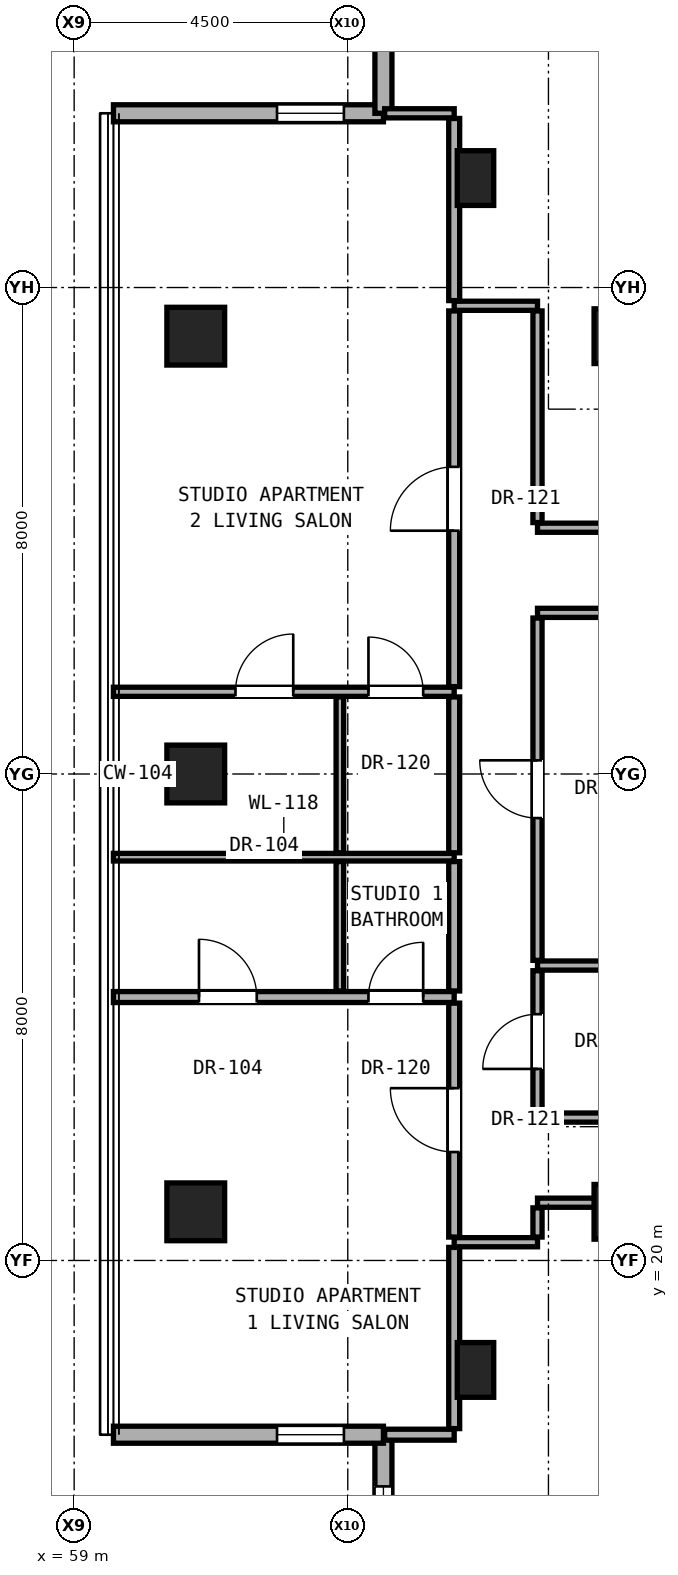
"""IFC4 building model, lengths in metres.
Left out: names, types, materials, properties, quantities, classifications, styles, units other than length and angle.
Written with IfcOpenShell. Run it as: python <this file> out.ifc"""

import sys

from ifc_helpers import new_model, si_unit, direction, frame, frame_2d, origin, origin_2d, place, context, subcontext, project, spatial, rectangle, hollow_rectangle, extrude, element, fill, save


model = new_model("IFC4")
c1 = context("Model", 3, precision=1e-05, world=origin(), true_north=direction((0.0, 1.0)))
c2 = subcontext(c1, "Body", "Model", "MODEL_VIEW")
j1 = project(units=[si_unit("LENGTHUNIT", "METRE"), si_unit("PLANEANGLEUNIT", "RADIAN")], contexts=[c1])
p1 = place(None, origin())
s1 = spatial("IfcSite", under=j1, at=p1, CompositionType="ELEMENT")
p2 = place(p1, origin())
s2 = spatial("IfcBuilding", under=s1, at=p2, CompositionType="ELEMENT")
p3 = place(p2, frame((0.0, 0.0, 190.15)))
s3 = spatial("IfcBuildingStorey", under=s2, at=p3, CompositionType="ELEMENT", Elevation=190.15)
for number, where, z_axis, x_axis in (
    (1, (68.0, 20.8, 0.0), (0.0, 0.0, 1.0), (1.0, 0.0, 0.0)),
    (2, (68.0, 35.2, 0.0), (0.0, 0.0, 1.0), (1.0, 0.0, 0.0)),
):
    element("IfcColumn", number, at=place(p3, frame(where, z_axis=z_axis, x_axis=x_axis)), inside=s3, PredefinedType="COLUMN", context=c2, shape_type="SweptSolid", body=[
        extrude(rectangle(XDim=0.9, YDim=0.9, at=origin_2d()), origin(), (0.0, 0.0, 1.0), 3.25),
    ])
for number, where, z_axis, x_axis in (
    (3, (61.0, 20.8, 0.0), (0.0, 0.0, 1.0), (1.0, 0.0, 0.0)),
    (4, (61.0, 28.0, 0.0), (0.0, 0.0, 1.0), (1.0, 0.0, 0.0)),
    (5, (61.0, 35.2, 0.0), (0.0, 0.0, 1.0), (1.0, 0.0, 0.0)),
):
    element("IfcColumn", number, at=place(p3, frame(where, z_axis=z_axis, x_axis=x_axis)), inside=s3, PredefinedType="COLUMN", context=c2, shape_type="SweptSolid", body=[
        extrude(hollow_rectangle(XDim=0.95, YDim=0.95, WallThickness=0.05, at=origin_2d()), origin(), (0.0, 0.0, 1.0), 3.25),
    ])
for number, where, z_axis, x_axis in (
    (6, (65.6, 18.2, 0.0), (0.0, 0.0, 1.0), (1.0, 0.0, 0.0)),
    (7, (65.6, 37.8, 0.0), (0.0, 0.0, 1.0), (1.0, 0.0, 0.0)),
):
    element("IfcColumn", number, at=place(p3, frame(where, z_axis=z_axis, x_axis=x_axis)), inside=s3, PredefinedType="PILASTER", context=c2, shape_type="SweptSolid", body=[
        extrude(rectangle(XDim=0.6, YDim=0.9, at=origin_2d()), origin(), (0.0, 0.0, 1.0), 3.25),
    ])
p4 = place(p3, frame((64.086, 17.135, 0.0), z_axis=(0.0, 0.0, 1.0), x_axis=(0.0, -1.0, 0.0)))
e8 = element("IfcWall", 8, at=p4, inside=s3, PredefinedType="SOLIDWALL", context=c2, shape_type="SweptSolid", body=[
    extrude(rectangle(XDim=4.44, YDim=0.28, at=frame_2d((2.22, 0.0))), origin(), (0.0, 0.0, 1.0), 3.03),
])
p5 = place(p4, frame((0.85, 0.0, 0.68)))
e9 = element("IfcOpeningElement", 9, at=p5, cuts=e8, PredefinedType="OPENING", context=c2, shape_type="SweptSolid", body=[
    extrude(rectangle(XDim=1.35, YDim=2.2, at=frame_2d((0.675, 1.1))), frame((0.0, 0.15, 0.0), z_axis=(0.0, -1.0, 0.0), x_axis=(1.0, 0.0, 0.0)), (0.0, 0.0, 1.0), 0.3),
])
p6 = place(p3, frame((59.646, 17.135, 0.0), z_axis=(0.0, 0.0, 1.0), x_axis=(1.0, 0.0, 0.0)))
e10 = element("IfcWall", 10, at=p6, inside=s3, PredefinedType="SOLIDWALL", context=c2, shape_type="SweptSolid", body=[
    extrude(rectangle(XDim=4.44, YDim=0.28, at=frame_2d((2.22, 0.0))), origin(), (0.0, 0.0, 1.0), 3.03),
])
p7 = place(p6, frame((2.69, 0.0, 0.85)))
e11 = element("IfcOpeningElement", 11, at=p7, cuts=e10, PredefinedType="OPENING", context=c2, shape_type="SweptSolid", body=[
    extrude(rectangle(XDim=1.1, YDim=2.0, at=frame_2d((0.55, 1.0))), frame((0.0, 0.15, 0.0), z_axis=(0.0, -1.0, 0.0), x_axis=(1.0, 0.0, 0.0)), (0.0, 0.0, 1.0), 0.3),
])
p8 = place(p3, frame((64.086, 38.865, 0.0), z_axis=(0.0, 0.0, 1.0), x_axis=(-1.0, 0.0, 0.0)))
e12 = element("IfcWall", 12, at=p8, inside=s3, PredefinedType="SOLIDWALL", context=c2, shape_type="SweptSolid", body=[
    extrude(rectangle(XDim=4.44, YDim=0.28, at=frame_2d((2.22, 0.0))), origin(), (0.0, 0.0, 1.0), 3.03),
])
p9 = place(p8, frame((0.65, 0.0, 0.85)))
e13 = element("IfcOpeningElement", 13, at=p9, cuts=e12, PredefinedType="OPENING", context=c2, shape_type="SweptSolid", body=[
    extrude(rectangle(XDim=1.1, YDim=2.0, at=frame_2d((0.55, 1.0))), frame((0.0, 0.15, 0.0), z_axis=(0.0, -1.0, 0.0), x_axis=(1.0, 0.0, 0.0)), (0.0, 0.0, 1.0), 0.3),
])
p10 = place(p3, frame((64.086, 43.305, 0.0), z_axis=(0.0, 0.0, 1.0), x_axis=(0.0, -1.0, 0.0)))
e14 = element("IfcWall", 14, at=p10, inside=s3, PredefinedType="SOLIDWALL", context=c2, shape_type="SweptSolid", body=[
    extrude(rectangle(XDim=4.44, YDim=0.28, at=frame_2d((2.22, 0.0))), origin(), (0.0, 0.0, 1.0), 3.03),
])
p11 = place(p3, frame((64.106, 17.135, 0.0), z_axis=(0.0, 0.0, 1.0), x_axis=(1.0, 0.0, 0.0)))
e15 = element("IfcWall", 15, at=p11, inside=s3, PredefinedType="PARTITIONING", context=c2, shape_type="SweptSolid", body=[
    extrude(rectangle(XDim=1.144, YDim=0.18, at=frame_2d((0.572, 0.0))), origin(), (0.0, 0.0, 1.0), 3.05),
])
p12 = place(p3, frame((65.25, 20.3, 0.0), z_axis=(0.0, 0.0, 1.0), x_axis=(1.0, 0.0, 0.0)))
e16 = element("IfcWall", 16, at=p12, inside=s3, PredefinedType="PARTITIONING", context=c2, shape_type="SweptSolid", body=[
    extrude(rectangle(XDim=1.37, YDim=0.15, at=frame_2d((0.685, 0.0))), origin(), (0.0, 0.0, 1.0), 3.05),
])
p13 = place(p3, frame((66.62, 20.95, 0.0), z_axis=(0.0, 0.0, 1.0), x_axis=(1.0, 0.0, 0.0)))
e17 = element("IfcWall", 17, at=p13, inside=s3, PredefinedType="PARTITIONING", context=c2, shape_type="SweptSolid", body=[
    extrude(rectangle(XDim=1.11, YDim=0.15, at=frame_2d((0.555, 0.0))), origin(), (0.0, 0.0, 1.0), 2.442),
])
p14 = place(p3, frame((66.62, 22.35, 0.0), z_axis=(0.0, 0.0, 1.0), x_axis=(1.0, 0.0, 0.0)))
e18 = element("IfcWall", 18, at=p14, inside=s3, PredefinedType="PARTITIONING", context=c2, shape_type="SweptSolid", body=[
    extrude(rectangle(XDim=10.14, YDim=0.15, at=frame_2d((5.07, 0.0))), origin(), (0.0, 0.0, 1.0), 2.186),
])
p15 = place(p3, frame((59.646, 24.332, 0.0), z_axis=(0.0, 0.0, 1.0), x_axis=(1.0, 0.0, 0.0)))
e19 = element("IfcWall", 19, at=p15, inside=s3, PredefinedType="PARTITIONING", context=c2, shape_type="SweptSolid", body=[
    extrude(rectangle(XDim=5.604, YDim=0.18, at=frame_2d((2.802, 0.0))), origin(), (0.0, 0.0, 1.0), 2.269),
])
p16 = place(p15, frame((1.407, 0.0, 0.0)))
e20 = element("IfcOpeningElement", 20, at=p16, cuts=e19, PredefinedType="OPENING", context=c2, shape_type="SweptSolid", body=[
    extrude(rectangle(XDim=0.95, YDim=2.15, at=frame_2d((0.475, 1.075))), frame((0.0, 0.1, 0.0), z_axis=(0.0, -1.0, 0.0), x_axis=(1.0, 0.0, 0.0)), (0.0, 0.0, 1.0), 0.2),
])
p17 = place(p15, frame((4.194, 0.0, 0.0)))
e21 = element("IfcOpeningElement", 21, at=p17, cuts=e19, PredefinedType="OPENING", context=c2, shape_type="SweptSolid", body=[
    extrude(rectangle(XDim=0.9, YDim=2.1, at=frame_2d((0.45, 1.05))), frame((0.0, 0.1, 0.0), z_axis=(0.0, -1.0, 0.0), x_axis=(1.0, 0.0, 0.0)), (0.0, 0.0, 1.0), 0.2),
])
p18 = place(p3, frame((66.62, 24.85, 0.0), z_axis=(0.0, 0.0, 1.0), x_axis=(1.0, 0.0, 0.0)))
e22 = element("IfcWall", 22, at=p18, inside=s3, PredefinedType="PARTITIONING", context=c2, shape_type="SweptSolid", body=[
    extrude(rectangle(XDim=3.13, YDim=0.15, at=frame_2d((1.565, 0.0))), origin(), (0.0, 0.0, 1.0), 2.186),
])
p19 = place(p3, frame((59.646, 26.632, 0.0), z_axis=(0.0, 0.0, 1.0), x_axis=(1.0, 0.0, 0.0)))
e23 = element("IfcWall", 23, at=p19, inside=s3, PredefinedType="PARTITIONING", context=c2, shape_type="SweptSolid", body=[
    extrude(rectangle(XDim=5.604, YDim=0.125, at=frame_2d((2.802, 0.0))), origin(), (0.0, 0.0, 1.0), 2.269),
])
p20 = place(p3, frame((59.646, 29.352, 0.0), z_axis=(0.0, 0.0, 1.0), x_axis=(1.0, 0.0, 0.0)))
e24 = element("IfcWall", 24, at=p20, inside=s3, PredefinedType="PARTITIONING", context=c2, shape_type="SweptSolid", body=[
    extrude(rectangle(XDim=5.604, YDim=0.15, at=frame_2d((2.802, 0.0))), origin(), (0.0, 0.0, 1.0), 2.269),
])
p21 = place(p20, frame((2.007, 0.0, 0.0)))
e25 = element("IfcOpeningElement", 25, at=p21, cuts=e24, PredefinedType="OPENING", context=c2, shape_type="SweptSolid", body=[
    extrude(rectangle(XDim=0.95, YDim=2.15, at=frame_2d((0.475, 1.075))), frame((0.0, 0.085, 0.0), z_axis=(0.0, -1.0, 0.0), x_axis=(1.0, 0.0, 0.0)), (0.0, 0.0, 1.0), 0.17),
])
p22 = place(p20, frame((4.194, 0.0, 0.0)))
e26 = element("IfcOpeningElement", 26, at=p22, cuts=e24, PredefinedType="OPENING", context=c2, shape_type="SweptSolid", body=[
    extrude(rectangle(XDim=0.9, YDim=2.1, at=frame_2d((0.45, 1.05))), frame((0.0, 0.085, 0.0), z_axis=(0.0, -1.0, 0.0), x_axis=(1.0, 0.0, 0.0)), (0.0, 0.0, 1.0), 0.17),
])
p23 = place(p3, frame((66.62, 30.65, 0.0), z_axis=(0.0, 0.0, 1.0), x_axis=(1.0, 0.0, 0.0)))
e27 = element("IfcWall", 27, at=p23, inside=s3, PredefinedType="PARTITIONING", context=c2, shape_type="SweptSolid", body=[
    extrude(rectangle(XDim=10.14, YDim=0.15, at=frame_2d((5.07, 0.0))), origin(), (0.0, 0.0, 1.0), 2.186),
])
p24 = place(p23, frame((6.14, 0.0, 0.0)))
e28 = element("IfcOpeningElement", 28, at=p24, cuts=e27, PredefinedType="OPENING", context=c2, shape_type="SweptSolid", body=[
    extrude(rectangle(XDim=0.95, YDim=2.15, at=frame_2d((0.475, 1.075))), frame((0.0, 0.085, 0.0), z_axis=(0.0, -1.0, 0.0), x_axis=(1.0, 0.0, 0.0)), (0.0, 0.0, 1.0), 0.17),
])
p25 = place(p3, frame((66.62, 32.05, 0.0), z_axis=(0.0, 0.0, 1.0), x_axis=(1.0, 0.0, 0.0)))
e29 = element("IfcWall", 29, at=p25, inside=s3, PredefinedType="PARTITIONING", context=c2, shape_type="SweptSolid", body=[
    extrude(rectangle(XDim=2.18, YDim=0.15, at=frame_2d((1.09, 0.0))), origin(), (0.0, 0.0, 1.0), 2.186),
])
p26 = place(p3, frame((65.25, 35.7, 0.0), z_axis=(0.0, 0.0, 1.0), x_axis=(1.0, 0.0, 0.0)))
e30 = element("IfcWall", 30, at=p26, inside=s3, PredefinedType="PARTITIONING", context=c2, shape_type="SweptSolid", body=[
    extrude(rectangle(XDim=1.37, YDim=0.15, at=frame_2d((0.685, 0.0))), origin(), (0.0, 0.0, 1.0), 3.05),
])
p27 = place(p3, frame((64.106, 38.865, 0.0), z_axis=(0.0, 0.0, 1.0), x_axis=(1.0, 0.0, 0.0)))
e31 = element("IfcWall", 31, at=p27, inside=s3, PredefinedType="PARTITIONING", context=c2, shape_type="SweptSolid", body=[
    extrude(rectangle(XDim=1.144, YDim=0.15, at=frame_2d((0.572, 0.0))), origin(), (0.0, 0.0, 1.0), 3.05),
])
p28 = place(p3, frame((63.37, 24.432, 0.0), z_axis=(0.0, 0.0, 1.0), x_axis=(0.0, 1.0, 0.0)))
e32 = element("IfcWall", 32, at=p28, inside=s3, PredefinedType="PARTITIONING", context=c2, shape_type="SweptSolid", body=[
    extrude(rectangle(XDim=2.128, YDim=0.125, at=frame_2d((1.064, 0.0))), origin(), (0.0, 0.0, 1.0), 3.05),
])
p29 = place(p3, frame((63.37, 26.705, 0.0), z_axis=(0.0, 0.0, 1.0), x_axis=(0.0, 1.0, 0.0)))
e33 = element("IfcWall", 33, at=p29, inside=s3, PredefinedType="PARTITIONING", context=c2, shape_type="SweptSolid", body=[
    extrude(rectangle(XDim=2.562, YDim=0.125, at=frame_2d((1.281, 0.0))), origin(), (0.0, 0.0, 1.0), 2.346),
])
p30 = place(p3, frame((65.25, 17.235, 0.0), z_axis=(0.0, 0.0, 1.0), x_axis=(0.0, 1.0, 0.0)))
e34 = element("IfcWall", 34, at=p30, inside=s3, PredefinedType="PARTITIONING", context=c2, shape_type="SweptSolid", body=[
    extrude(rectangle(XDim=2.98, YDim=0.18, at=frame_2d((1.49, 0.0))), origin(), (0.0, 0.0, 1.0), 2.493),
])
p31 = place(p3, frame((65.25, 20.385, 0.0), z_axis=(0.0, 0.0, 1.0), x_axis=(0.0, 1.0, 0.0)))
e35 = element("IfcWall", 35, at=p31, inside=s3, PredefinedType="PARTITIONING", context=c2, shape_type="SweptSolid", body=[
    extrude(rectangle(XDim=3.847, YDim=0.18, at=frame_2d((1.923, 0.0))), origin(), (0.0, 0.0, 1.0), 2.442),
])
p32 = place(p31, frame((1.398, 0.0, 0.0)))
e36 = element("IfcOpeningElement", 36, at=p32, cuts=e35, PredefinedType="OPENING", context=c2, shape_type="SweptSolid", body=[
    extrude(rectangle(XDim=1.05, YDim=2.2, at=frame_2d((0.525, 1.1))), frame((0.0, 0.1, 0.0), z_axis=(0.0, -1.0, 0.0), x_axis=(1.0, 0.0, 0.0)), (0.0, 0.0, 1.0), 0.2),
])
p33 = place(p3, frame((65.25, 24.432, 0.0), z_axis=(0.0, 0.0, 1.0), x_axis=(0.0, 1.0, 0.0)))
e37 = element("IfcWall", 37, at=p33, inside=s3, PredefinedType="PARTITIONING", context=c2, shape_type="SweptSolid", body=[
    extrude(rectangle(XDim=2.128, YDim=0.18, at=frame_2d((1.064, 0.0))), origin(), (0.0, 0.0, 1.0), 3.05),
])
p34 = place(p3, frame((65.25, 26.705, 0.0), z_axis=(0.0, 0.0, 1.0), x_axis=(0.0, 1.0, 0.0)))
e38 = element("IfcWall", 38, at=p34, inside=s3, PredefinedType="PARTITIONING", context=c2, shape_type="SweptSolid", body=[
    extrude(rectangle(XDim=2.562, YDim=0.18, at=frame_2d((1.281, 0.0))), origin(), (0.0, 0.0, 1.0), 2.346),
])
p35 = place(p3, frame((65.25, 29.437, 0.0), z_axis=(0.0, 0.0, 1.0), x_axis=(0.0, 1.0, 0.0)))
e39 = element("IfcWall", 39, at=p35, inside=s3, PredefinedType="PARTITIONING", context=c2, shape_type="SweptSolid", body=[
    extrude(rectangle(XDim=6.178, YDim=0.18, at=frame_2d((3.089, 0.0))), origin(), (0.0, 0.0, 1.0), 2.442),
])
p36 = place(p35, frame((2.564, 0.0, 0.0)))
e40 = element("IfcOpeningElement", 40, at=p36, cuts=e39, PredefinedType="OPENING", context=c2, shape_type="SweptSolid", body=[
    extrude(rectangle(XDim=1.05, YDim=2.2, at=frame_2d((0.525, 1.1))), frame((0.0, 0.1, 0.0), z_axis=(0.0, -1.0, 0.0), x_axis=(1.0, 0.0, 0.0)), (0.0, 0.0, 1.0), 0.2),
])
p37 = place(p3, frame((65.25, 35.785, 0.0), z_axis=(0.0, 0.0, 1.0), x_axis=(0.0, 1.0, 0.0)))
e41 = element("IfcWall", 41, at=p37, inside=s3, PredefinedType="PARTITIONING", context=c2, shape_type="SweptSolid", body=[
    extrude(rectangle(XDim=2.995, YDim=0.18, at=frame_2d((1.498, 0.0))), origin(), (0.0, 0.0, 1.0), 2.493),
])
p38 = place(p3, frame((66.62, 20.385, 0.0), z_axis=(0.0, 0.0, 1.0), x_axis=(0.0, 1.0, 0.0)))
e42 = element("IfcWall", 42, at=p38, inside=s3, PredefinedType="PARTITIONING", context=c2, shape_type="SweptSolid", body=[
    extrude(rectangle(XDim=0.48, YDim=0.15, at=frame_2d((0.24, 0.0))), origin(), (0.0, 0.0, 1.0), 2.442),
])
p39 = place(p3, frame((66.62, 22.435, 0.0), z_axis=(0.0, 0.0, 1.0), x_axis=(0.0, 1.0, 0.0)))
e43 = element("IfcWall", 43, at=p39, inside=s3, PredefinedType="PARTITIONING", context=c2, shape_type="SweptSolid", body=[
    extrude(rectangle(XDim=2.33, YDim=0.15, at=frame_2d((1.165, 0.0))), origin(), (0.0, 0.0, 1.0), 3.05),
])
p40 = place(p39, frame((0.715, 0.0, 0.0)))
e44 = element("IfcOpeningElement", 44, at=p40, cuts=e43, PredefinedType="OPENING", context=c2, shape_type="SweptSolid", body=[
    extrude(rectangle(XDim=0.9, YDim=2.1, at=frame_2d((0.45, 1.05))), frame((0.0, 0.085, 0.0), z_axis=(0.0, -1.0, 0.0), x_axis=(1.0, 0.0, 0.0)), (0.0, 0.0, 1.0), 0.17),
])
p41 = place(p3, frame((66.62, 24.935, 0.0), z_axis=(0.0, 0.0, 1.0), x_axis=(0.0, 1.0, 0.0)))
e45 = element("IfcWall", 45, at=p41, inside=s3, PredefinedType="PARTITIONING", context=c2, shape_type="SweptSolid", body=[
    extrude(rectangle(XDim=5.63, YDim=0.15, at=frame_2d((2.815, 0.0))), origin(), (0.0, 0.0, 1.0), 2.346),
])
p42 = place(p41, frame((2.34, 0.0, 0.0)))
e46 = element("IfcOpeningElement", 46, at=p42, cuts=e45, PredefinedType="OPENING", context=c2, shape_type="SweptSolid", body=[
    extrude(rectangle(XDim=0.95, YDim=2.15, at=frame_2d((0.475, 1.075))), frame((0.0, 0.085, 0.0), z_axis=(0.0, -1.0, 0.0), x_axis=(1.0, 0.0, 0.0)), (0.0, 0.0, 1.0), 0.17),
])
p43 = place(p3, frame((66.62, 32.135, 0.0), z_axis=(0.0, 0.0, 1.0), x_axis=(0.0, 1.0, 0.0)))
e47 = element("IfcWall", 47, at=p43, inside=s3, PredefinedType="PARTITIONING", context=c2, shape_type="SweptSolid", body=[
    extrude(rectangle(XDim=3.48, YDim=0.15, at=frame_2d((1.74, 0.0))), origin(), (0.0, 0.0, 1.0), 2.442),
])
p44 = place(p5, origin())
e48 = element("IfcWindow", 48, at=p44, inside=s3, PartitioningType="SINGLE_PANEL", PredefinedType="WINDOW", context=c2, shape_type="SweptSolid", body=[
    extrude(rectangle(XDim=1.35, YDim=2.2, at=frame_2d((0.675, 1.1))), frame((0.0, 0.03, 0.0), z_axis=(0.0, -1.0, 0.0), x_axis=(1.0, 0.0, 0.0)), (0.0, 0.0, 1.0), 0.06),
])
fill(e9, e48)
p45 = place(p7, origin())
e49 = element("IfcWindow", 49, at=p45, inside=s3, PartitioningType="SINGLE_PANEL", PredefinedType="WINDOW", context=c2, shape_type="SweptSolid", body=[
    extrude(rectangle(XDim=1.1, YDim=2.0, at=frame_2d((0.55, 1.0))), frame((0.0, 0.03, 0.0), z_axis=(0.0, -1.0, 0.0), x_axis=(1.0, 0.0, 0.0)), (0.0, 0.0, 1.0), 0.06),
])
fill(e11, e49)
p46 = place(p9, origin())
e50 = element("IfcWindow", 50, at=p46, inside=s3, PartitioningType="SINGLE_PANEL", PredefinedType="WINDOW", context=c2, shape_type="SweptSolid", body=[
    extrude(rectangle(XDim=1.1, YDim=2.0, at=frame_2d((0.55, 1.0))), frame((0.0, 0.03, 0.0), z_axis=(0.0, -1.0, 0.0), x_axis=(1.0, 0.0, 0.0)), (0.0, 0.0, 1.0), 0.06),
])
fill(e13, e50)
p47 = place(p40, origin())
e51 = element("IfcDoor", 51, at=p47, inside=s3, OperationType="SINGLE_SWING_LEFT", PredefinedType="DOOR", context=c2, shape_type="SweptSolid", body=[
    extrude(rectangle(XDim=0.9, YDim=2.1, at=frame_2d((0.45, 1.05))), frame((0.0, 0.025, 0.0), z_axis=(0.0, -1.0, 0.0), x_axis=(1.0, 0.0, 0.0)), (0.0, 0.0, 1.0), 0.05),
])
fill(e44, e51)
p48 = place(p32, origin())
e52 = element("IfcDoor", 52, at=p48, inside=s3, OperationType="SINGLE_SWING_RIGHT", PredefinedType="DOOR", context=c2, shape_type="SweptSolid", body=[
    extrude(rectangle(XDim=1.05, YDim=2.2, at=frame_2d((0.525, 1.1))), frame((0.0, 0.025, 0.0), z_axis=(0.0, -1.0, 0.0), x_axis=(1.0, 0.0, 0.0)), (0.0, 0.0, 1.0), 0.05),
])
fill(e36, e52)
p49 = place(p16, origin())
e53 = element("IfcDoor", 53, at=p49, inside=s3, OperationType="SINGLE_SWING_LEFT", PredefinedType="DOOR", context=c2, shape_type="SweptSolid", body=[
    extrude(rectangle(XDim=0.95, YDim=2.15, at=frame_2d((0.475, 1.075))), frame((0.0, 0.025, 0.0), z_axis=(0.0, -1.0, 0.0), x_axis=(1.0, 0.0, 0.0)), (0.0, 0.0, 1.0), 0.05),
])
fill(e20, e53)
p50 = place(p17, origin())
e54 = element("IfcDoor", 54, at=p50, inside=s3, OperationType="SINGLE_SWING_RIGHT", PredefinedType="DOOR", context=c2, shape_type="SweptSolid", body=[
    extrude(rectangle(XDim=0.9, YDim=2.1, at=frame_2d((0.45, 1.05))), frame((0.0, 0.025, 0.0), z_axis=(0.0, -1.0, 0.0), x_axis=(1.0, 0.0, 0.0)), (0.0, 0.0, 1.0), 0.05),
])
fill(e21, e54)
p51 = place(p36, origin())
e55 = element("IfcDoor", 55, at=p51, inside=s3, OperationType="SINGLE_SWING_LEFT", PredefinedType="DOOR", context=c2, shape_type="SweptSolid", body=[
    extrude(rectangle(XDim=1.05, YDim=2.2, at=frame_2d((0.525, 1.1))), frame((0.0, 0.025, 0.0), z_axis=(0.0, -1.0, 0.0), x_axis=(1.0, 0.0, 0.0)), (0.0, 0.0, 1.0), 0.05),
])
fill(e40, e55)
p52 = place(p21, origin())
e56 = element("IfcDoor", 56, at=p52, inside=s3, OperationType="SINGLE_SWING_RIGHT", PredefinedType="DOOR", context=c2, shape_type="SweptSolid", body=[
    extrude(rectangle(XDim=0.95, YDim=2.15, at=frame_2d((0.475, 1.075))), frame((0.0, 0.025, 0.0), z_axis=(0.0, -1.0, 0.0), x_axis=(1.0, 0.0, 0.0)), (0.0, 0.0, 1.0), 0.05),
])
fill(e25, e56)
p53 = place(p22, origin())
e57 = element("IfcDoor", 57, at=p53, inside=s3, OperationType="SINGLE_SWING_LEFT", PredefinedType="DOOR", context=c2, shape_type="SweptSolid", body=[
    extrude(rectangle(XDim=0.9, YDim=2.1, at=frame_2d((0.45, 1.05))), frame((0.0, 0.025, 0.0), z_axis=(0.0, -1.0, 0.0), x_axis=(1.0, 0.0, 0.0)), (0.0, 0.0, 1.0), 0.05),
])
fill(e26, e57)
p54 = place(p42, origin())
e58 = element("IfcDoor", 58, at=p54, inside=s3, OperationType="SINGLE_SWING_RIGHT", PredefinedType="DOOR", context=c2, shape_type="SweptSolid", body=[
    extrude(rectangle(XDim=0.95, YDim=2.15, at=frame_2d((0.475, 1.075))), frame((0.0, 0.025, 0.0), z_axis=(0.0, -1.0, 0.0), x_axis=(1.0, 0.0, 0.0)), (0.0, 0.0, 1.0), 0.05),
])
fill(e46, e58)
save(model, sys.argv[1])
